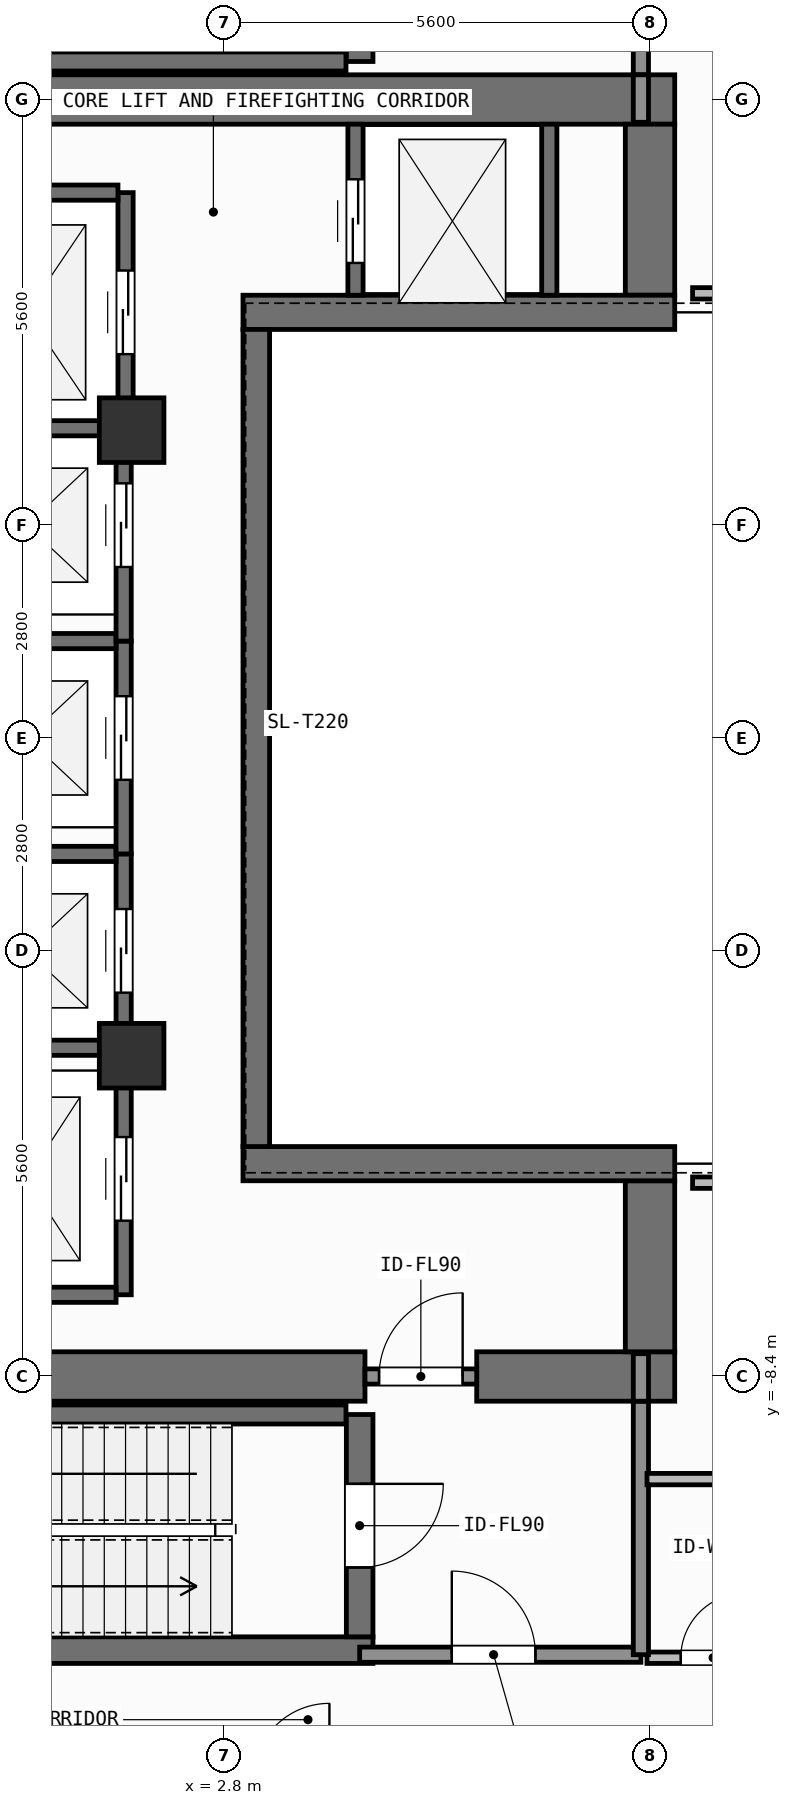
"""IFC4 building model, lengths in metres.
Left out: names, types, materials, properties, quantities, classifications, styles, units other than length and angle.
Written with IfcOpenShell. Run it as: python <this file> out.ifc"""

import sys

from ifc_helpers import new_model, si_unit, direction, frame, frame_2d, origin, origin_2d, place, context, subcontext, project, spatial, rectangle, extrude, element, fill, save


model = new_model("IFC4")
c1 = context("Model", 3, precision=1e-05, world=origin(), true_north=direction((0.0, 1.0)))
c2 = subcontext(c1, "Body", "Model", "MODEL_VIEW")
j1 = project(units=[si_unit("LENGTHUNIT", "METRE"), si_unit("PLANEANGLEUNIT", "RADIAN")], contexts=[c1])
p1 = place(None, origin())
s1 = spatial("IfcSite", under=j1, at=p1, CompositionType="ELEMENT")
p2 = place(p1, origin())
s2 = spatial("IfcBuilding", under=s1, at=p2, CompositionType="ELEMENT")
p3 = place(p2, frame((0.0, 0.0, 266.4)))
s3 = spatial("IfcBuildingStorey", under=s2, at=p3, CompositionType="ELEMENT", Elevation=266.4)
p4 = place(p3, frame((-2.62, -8.4, 0.0), z_axis=(0.0, 0.0, 1.0), x_axis=(1.0, 0.0, 0.0)))
e1 = element("IfcWall", 1, at=p4, inside=s3, PredefinedType="SHEAR", context=c2, shape_type="SweptSolid", body=[
    extrude(rectangle(XDim=7.27, YDim=0.65, at=frame_2d((3.635, 0.0))), origin(), (0.0, 0.0, 1.0), 3.9),
])
p5 = place(p3, frame((6.12, -8.4, 0.0), z_axis=(0.0, 0.0, 1.0), x_axis=(1.0, 0.0, 0.0)))
e2 = element("IfcWall", 2, at=p5, inside=s3, PredefinedType="SHEAR", context=c2, shape_type="SweptSolid", body=[
    extrude(rectangle(XDim=2.605, YDim=0.65, at=frame_2d((1.302, 0.0))), origin(), (0.0, 0.0, 1.0), 3.9),
])
p6 = place(p3, frame((-7.55, 8.4, 0.0), z_axis=(0.0, 0.0, 1.0), x_axis=(1.0, 0.0, 0.0)))
e3 = element("IfcWall", 3, at=p6, inside=s3, PredefinedType="SHEAR", context=c2, shape_type="SweptSolid", body=[
    extrude(rectangle(XDim=16.275, YDim=0.65, at=frame_2d((8.138, 0.0))), origin(), (0.0, 0.0, 1.0), 3.9),
])
for number, where, z_axis, x_axis in (
    (4, (8.4, -8.075, 0.0), (0.0, 0.0, 1.0), (0.0, 1.0, 0.0)),
    (5, (8.4, 5.825, 0.0), (0.0, 0.0, 1.0), (0.0, 1.0, 0.0)),
):
    element("IfcWall", number, at=place(p3, frame(where, z_axis=z_axis, x_axis=x_axis)), inside=s3, PredefinedType="SHEAR", context=c2, shape_type="SweptSolid", body=[
        extrude(rectangle(XDim=2.25, YDim=0.65, at=frame_2d((1.125, 0.0))), origin(), (0.0, 0.0, 1.0), 3.9),
    ])
for number, where, z_axis, x_axis in (
    (6, (3.045, -5.6, 0.0), (0.0, 0.0, 1.0), (1.0, 0.0, 0.0)),
    (7, (3.045, 5.6, 0.0), (0.0, 0.0, 1.0), (1.0, 0.0, 0.0)),
):
    element("IfcWall", number, at=place(p3, frame(where, z_axis=z_axis, x_axis=x_axis)), inside=s3, PredefinedType="SHEAR", context=c2, shape_type="SweptSolid", body=[
        extrude(rectangle(XDim=5.68, YDim=0.45, at=frame_2d((2.84, 0.0))), origin(), (0.0, 0.0, 1.0), 3.9),
    ])
p7 = place(p3, frame((3.22, -5.375, 0.0), z_axis=(0.0, 0.0, 1.0), x_axis=(0.0, 1.0, 0.0)))
e8 = element("IfcWall", 8, at=p7, inside=s3, PredefinedType="SHEAR", context=c2, shape_type="SweptSolid", body=[
    extrude(rectangle(XDim=10.75, YDim=0.35, at=frame_2d((5.375, 0.0))), origin(), (0.0, 0.0, 1.0), 3.9),
])
p8 = place(p3, frame((-2.555, -12.0, 0.0), z_axis=(0.0, 0.0, 1.0), x_axis=(1.0, 0.0, 0.0)))
e9 = element("IfcWall", 9, at=p8, inside=s3, PredefinedType="SHEAR", context=c2, shape_type="SweptSolid", body=[
    extrude(rectangle(XDim=7.31, YDim=0.35, at=frame_2d((3.655, 0.0))), origin(), (0.0, 0.0, 1.0), 3.9),
])
p9 = place(p3, frame((-2.2, -8.9, 0.0), z_axis=(0.0, 0.0, 1.0), x_axis=(1.0, 0.0, 0.0)))
e10 = element("IfcWall", 10, at=p9, inside=s3, PredefinedType="SHEAR", context=c2, shape_type="SweptSolid", body=[
    extrude(rectangle(XDim=6.6, YDim=0.25, at=frame_2d((3.3, 0.0))), origin(), (0.0, 0.0, 1.0), 3.9),
])
p10 = place(p3, frame((4.58, -8.9, 0.0), z_axis=(0.0, 0.0, 1.0), x_axis=(0.0, -1.0, 0.0)))
e11 = element("IfcWall", 11, at=p10, inside=s3, PredefinedType="SHEAR", context=c2, shape_type="SweptSolid", body=[
    extrude(rectangle(XDim=2.925, YDim=0.35, at=frame_2d((1.462, 0.0))), origin(), (0.0, 0.0, 1.0), 3.9),
])
p11 = place(p10, frame((0.913, 0.0, 0.0)))
e12 = element("IfcOpeningElement", 12, at=p11, cuts=e11, PredefinedType="OPENING", context=c2, shape_type="SweptSolid", body=[
    extrude(rectangle(XDim=1.1, YDim=2.15, at=frame_2d((0.55, 1.075))), frame((0.0, 0.185, 0.0), z_axis=(0.0, -1.0, 0.0), x_axis=(1.0, 0.0, 0.0)), (0.0, 0.0, 1.0), 0.37),
])
p12 = place(p3, frame((-2.2, 8.9, 0.0), z_axis=(0.0, 0.0, 1.0), x_axis=(1.0, 0.0, 0.0)))
e13 = element("IfcWall", 13, at=p12, inside=s3, PredefinedType="SHEAR", context=c2, shape_type="SweptSolid", body=[
    extrude(rectangle(XDim=6.6, YDim=0.25, at=frame_2d((3.3, 0.0))), origin(), (0.0, 0.0, 1.0), 3.9),
])
p13 = place(p3, frame((4.58, 11.825, 0.0), z_axis=(0.0, 0.0, 1.0), x_axis=(0.0, -1.0, 0.0)))
e14 = element("IfcWall", 14, at=p13, inside=s3, PredefinedType="SHEAR", context=c2, shape_type="SweptSolid", body=[
    extrude(rectangle(XDim=2.925, YDim=0.35, at=frame_2d((1.462, 0.0))), origin(), (0.0, 0.0, 1.0), 3.9),
])
p14 = place(p13, frame((0.913, 0.0, 0.0)))
e15 = element("IfcOpeningElement", 15, at=p14, cuts=e14, PredefinedType="OPENING", context=c2, shape_type="SweptSolid", body=[
    extrude(rectangle(XDim=1.1, YDim=2.15, at=frame_2d((0.55, 1.075))), frame((0.0, 0.185, 0.0), z_axis=(0.0, -1.0, 0.0), x_axis=(1.0, 0.0, 0.0)), (0.0, 0.0, 1.0), 0.37),
])
for number, where, z_axis, x_axis in (
    (16, (1.58, -4.18, 0.0), (0.0, 0.0, 1.0), (1.0, 0.0, 0.0)),
    (17, (1.58, 4.05, 0.0), (0.0, 0.0, 1.0), (1.0, 0.0, 0.0)),
):
    element("IfcColumn", number, at=place(p3, frame(where, z_axis=z_axis, x_axis=x_axis)), inside=s3, PredefinedType="COLUMN", context=c2, shape_type="SweptSolid", body=[
        extrude(rectangle(XDim=0.85, YDim=0.85, at=origin_2d()), origin(), (0.0, 0.0, 1.0), 3.9),
    ])
p15 = place(p3, frame((1.475, -4.275, 0.0), z_axis=(0.0, 0.0, 1.0), x_axis=(0.0, 1.0, 0.0)))
e18 = element("IfcWall", 18, at=p15, inside=s3, PredefinedType="SHEAR", context=c2, shape_type="SweptSolid", body=[
    extrude(rectangle(XDim=2.75, YDim=0.2, at=frame_2d((1.375, 0.0))), origin(), (0.0, 0.0, 1.0), 3.68),
])
p16 = place(p15, frame((0.925, 0.0, 0.0)))
e19 = element("IfcOpeningElement", 19, at=p16, cuts=e18, PredefinedType="OPENING", context=c2, shape_type="SweptSolid", body=[
    extrude(rectangle(XDim=1.1, YDim=2.2, at=frame_2d((0.55, 1.1))), frame((0.0, 0.11, 0.0), z_axis=(0.0, -1.0, 0.0), x_axis=(1.0, 0.0, 0.0)), (0.0, 0.0, 1.0), 0.22),
])
for number, where, z_axis, x_axis in (
    (20, (-0.975, -4.075, 0.0), (0.0, 0.0, 1.0), (1.0, 0.0, 0.0)),
    (21, (-0.975, -1.525, 0.0), (0.0, 0.0, 1.0), (1.0, 0.0, 0.0)),
):
    element("IfcWall", number, at=place(p3, frame(where, z_axis=z_axis, x_axis=x_axis)), inside=s3, PredefinedType="SHEAR", context=c2, shape_type="SweptSolid", body=[
        extrude(rectangle(XDim=2.35, YDim=0.2, at=frame_2d((1.175, 0.0))), origin(), (0.0, 0.0, 1.0), 3.68),
    ])
p17 = place(p3, frame((1.475, -1.525, 0.0), z_axis=(0.0, 0.0, 1.0), x_axis=(0.0, 1.0, 0.0)))
e22 = element("IfcWall", 22, at=p17, inside=s3, PredefinedType="SHEAR", context=c2, shape_type="SweptSolid", body=[
    extrude(rectangle(XDim=2.8, YDim=0.2, at=frame_2d((1.4, 0.0))), origin(), (0.0, 0.0, 1.0), 3.68),
])
p18 = place(p17, frame((0.975, 0.0, 0.0)))
e23 = element("IfcOpeningElement", 23, at=p18, cuts=e22, PredefinedType="OPENING", context=c2, shape_type="SweptSolid", body=[
    extrude(rectangle(XDim=1.1, YDim=2.2, at=frame_2d((0.55, 1.1))), frame((0.0, 0.11, 0.0), z_axis=(0.0, -1.0, 0.0), x_axis=(1.0, 0.0, 0.0)), (0.0, 0.0, 1.0), 0.22),
])
p19 = place(p3, frame((-0.975, 1.275, 0.0), z_axis=(0.0, 0.0, 1.0), x_axis=(1.0, 0.0, 0.0)))
e24 = element("IfcWall", 24, at=p19, inside=s3, PredefinedType="SHEAR", context=c2, shape_type="SweptSolid", body=[
    extrude(rectangle(XDim=2.35, YDim=0.2, at=frame_2d((1.175, 0.0))), origin(), (0.0, 0.0, 1.0), 3.68),
])
p20 = place(p3, frame((1.475, 1.275, 0.0), z_axis=(0.0, 0.0, 1.0), x_axis=(0.0, 1.0, 0.0)))
e25 = element("IfcWall", 25, at=p20, inside=s3, PredefinedType="SHEAR", context=c2, shape_type="SweptSolid", body=[
    extrude(rectangle(XDim=2.8, YDim=0.2, at=frame_2d((1.4, 0.0))), origin(), (0.0, 0.0, 1.0), 3.68),
])
p21 = place(p20, frame((0.975, 0.0, 0.0)))
e26 = element("IfcOpeningElement", 26, at=p21, cuts=e25, PredefinedType="OPENING", context=c2, shape_type="SweptSolid", body=[
    extrude(rectangle(XDim=1.1, YDim=2.2, at=frame_2d((0.55, 1.1))), frame((0.0, 0.11, 0.0), z_axis=(0.0, -1.0, 0.0), x_axis=(1.0, 0.0, 0.0)), (0.0, 0.0, 1.0), 0.22),
])
p22 = place(p3, frame((-0.975, 4.075, 0.0), z_axis=(0.0, 0.0, 1.0), x_axis=(1.0, 0.0, 0.0)))
e27 = element("IfcWall", 27, at=p22, inside=s3, PredefinedType="SHEAR", context=c2, shape_type="SweptSolid", body=[
    extrude(rectangle(XDim=2.35, YDim=0.2, at=frame_2d((1.175, 0.0))), origin(), (0.0, 0.0, 1.0), 3.68),
])
p23 = place(p3, frame((1.5, 4.025, 0.0), z_axis=(0.0, 0.0, 1.0), x_axis=(0.0, 1.0, 0.0)))
e28 = element("IfcWall", 28, at=p23, inside=s3, PredefinedType="SHEAR", context=c2, shape_type="SweptSolid", body=[
    extrude(rectangle(XDim=3.15, YDim=0.2, at=frame_2d((1.575, 0.0))), origin(), (0.0, 0.0, 1.0), 3.68),
])
p24 = place(p23, frame((1.025, 0.0, 0.0)))
e29 = element("IfcOpeningElement", 29, at=p24, cuts=e28, PredefinedType="OPENING", context=c2, shape_type="SweptSolid", body=[
    extrude(rectangle(XDim=1.1, YDim=2.2, at=frame_2d((0.55, 1.1))), frame((0.0, 0.11, 0.0), z_axis=(0.0, -1.0, 0.0), x_axis=(1.0, 0.0, 0.0)), (0.0, 0.0, 1.0), 0.22),
])
p25 = place(p3, frame((-1.0, 7.175, 0.0), z_axis=(0.0, 0.0, 1.0), x_axis=(1.0, 0.0, 0.0)))
e30 = element("IfcWall", 30, at=p25, inside=s3, PredefinedType="SHEAR", context=c2, shape_type="SweptSolid", body=[
    extrude(rectangle(XDim=2.4, YDim=0.2, at=frame_2d((1.2, 0.0))), origin(), (0.0, 0.0, 1.0), 3.68),
])
p26 = place(p3, frame((1.475, -7.325, 0.0), z_axis=(0.0, 0.0, 1.0), x_axis=(0.0, 1.0, 0.0)))
e31 = element("IfcWall", 31, at=p26, inside=s3, PredefinedType="SHEAR", context=c2, shape_type="SweptSolid", body=[
    extrude(rectangle(XDim=3.05, YDim=0.2, at=frame_2d((1.525, 0.0))), origin(), (0.0, 0.0, 1.0), 3.68),
])
p27 = place(p26, frame((0.975, 0.0, 0.0)))
e32 = element("IfcOpeningElement", 32, at=p27, cuts=e31, PredefinedType="OPENING", context=c2, shape_type="SweptSolid", body=[
    extrude(rectangle(XDim=1.1, YDim=2.2, at=frame_2d((0.55, 1.1))), frame((0.0, 0.11, 0.0), z_axis=(0.0, -1.0, 0.0), x_axis=(1.0, 0.0, 0.0)), (0.0, 0.0, 1.0), 0.22),
])
p28 = place(p3, frame((-0.975, -7.325, 0.0), z_axis=(0.0, 0.0, 1.0), x_axis=(1.0, 0.0, 0.0)))
e33 = element("IfcWall", 33, at=p28, inside=s3, PredefinedType="SHEAR", context=c2, shape_type="SweptSolid", body=[
    extrude(rectangle(XDim=2.35, YDim=0.2, at=frame_2d((1.175, 0.0))), origin(), (0.0, 0.0, 1.0), 3.68),
])
p29 = place(p3, frame((4.525, 5.825, 0.0), z_axis=(0.0, 0.0, 1.0), x_axis=(0.0, 1.0, 0.0)))
e34 = element("IfcWall", 34, at=p29, inside=s3, PredefinedType="SHEAR", context=c2, shape_type="SweptSolid", body=[
    extrude(rectangle(XDim=2.25, YDim=0.2, at=frame_2d((1.125, 0.0))), origin(), (0.0, 0.0, 1.0), 3.68),
])
p30 = place(p29, frame((0.425, 0.0, 0.0)))
e35 = element("IfcOpeningElement", 35, at=p30, cuts=e34, PredefinedType="OPENING", context=c2, shape_type="SweptSolid", body=[
    extrude(rectangle(XDim=1.1, YDim=2.2, at=frame_2d((0.55, 1.1))), frame((0.0, 0.11, 0.0), z_axis=(0.0, -1.0, 0.0), x_axis=(1.0, 0.0, 0.0)), (0.0, 0.0, 1.0), 0.22),
])
p31 = place(p3, frame((7.075, 5.825, 0.0), z_axis=(0.0, 0.0, 1.0), x_axis=(0.0, 1.0, 0.0)))
e36 = element("IfcWall", 36, at=p31, inside=s3, PredefinedType="SHEAR", context=c2, shape_type="SweptSolid", body=[
    extrude(rectangle(XDim=2.25, YDim=0.2, at=frame_2d((1.125, 0.0))), origin(), (0.0, 0.0, 1.0), 3.68),
])
p32 = place(p3, frame((4.58, -12.06, 0.0), z_axis=(0.0, 0.0, 1.0), x_axis=(1.0, 0.0, 0.0)))
e37 = element("IfcWall", 37, at=p32, inside=s3, PredefinedType="SOLIDWALL", context=c2, shape_type="SweptSolid", body=[
    extrude(rectangle(XDim=3.7, YDim=0.2, at=frame_2d((1.85, 0.0))), origin(), (0.0, 0.0, 1.0), 3.68),
])
p33 = place(p32, frame((1.212, 0.0, 0.0)))
e38 = element("IfcOpeningElement", 38, at=p33, cuts=e37, PredefinedType="OPENING", context=c2, shape_type="SweptSolid", body=[
    extrude(rectangle(XDim=1.1, YDim=2.15, at=frame_2d((0.55, 1.075))), frame((0.0, 0.11, 0.0), z_axis=(0.0, -1.0, 0.0), x_axis=(1.0, 0.0, 0.0)), (0.0, 0.0, 1.0), 0.22),
])
p34 = place(p3, frame((4.65, -8.4, 0.0), z_axis=(0.0, 0.0, 1.0), x_axis=(1.0, 0.0, 0.0)))
e39 = element("IfcWall", 39, at=p34, inside=s3, PredefinedType="SOLIDWALL", context=c2, shape_type="SweptSolid", body=[
    extrude(rectangle(XDim=1.47, YDim=0.2, at=frame_2d((0.735, 0.0))), origin(), (0.0, 0.0, 1.0), 2.92),
])
p35 = place(p34, frame((0.185, 0.0, 0.0)))
e40 = element("IfcOpeningElement", 40, at=p35, cuts=e39, PredefinedType="OPENING", context=c2, shape_type="SweptSolid", body=[
    extrude(rectangle(XDim=1.1, YDim=2.15, at=frame_2d((0.55, 1.075))), frame((0.0, 0.11, 0.0), z_axis=(0.0, -1.0, 0.0), x_axis=(1.0, 0.0, 0.0)), (0.0, 0.0, 1.0), 0.22),
])
p36 = place(p3, frame((8.36, -12.1, 0.0), z_axis=(0.0, 0.0, 1.0), x_axis=(1.0, 0.0, 0.0)))
e41 = element("IfcWall", 41, at=p36, inside=s3, PredefinedType="PARTITIONING", context=c2, shape_type="SweptSolid", body=[
    extrude(rectangle(XDim=1.74, YDim=0.15, at=frame_2d((0.87, 0.0))), origin(), (0.0, 0.0, 1.0), 3.68),
])
p37 = place(p36, frame((0.445, 0.0, 0.0)))
e42 = element("IfcOpeningElement", 42, at=p37, cuts=e41, PredefinedType="OPENING", context=c2, shape_type="SweptSolid", body=[
    extrude(rectangle(XDim=0.85, YDim=2.1, at=frame_2d((0.425, 1.05))), frame((0.0, 0.085, 0.0), z_axis=(0.0, -1.0, 0.0), x_axis=(1.0, 0.0, 0.0)), (0.0, 0.0, 1.0), 0.17),
])
for number, where, z_axis, x_axis in (
    (43, (8.28, -12.06, 0.0), (0.0, 0.0, 1.0), (0.0, 1.0, 0.0)),
    (44, (8.28, 8.725, 0.0), (0.0, 0.0, 1.0), (0.0, 1.0, 0.0)),
):
    element("IfcWall", number, at=place(p3, frame(where, z_axis=z_axis, x_axis=x_axis)), inside=s3, PredefinedType="SOLIDWALL", context=c2, shape_type="SweptSolid", body=[
        extrude(rectangle(XDim=3.335, YDim=0.2, at=frame_2d((1.667, 0.0))), origin(), (0.0, 0.0, 1.0), 3.68),
    ])
p38 = place(p3, frame((8.28, -8.725, 0.0), z_axis=(0.0, 0.0, 1.0), x_axis=(0.0, 1.0, 0.0)))
e45 = element("IfcWall", 45, at=p38, inside=s3, PredefinedType="SOLIDWALL", context=c2, shape_type="SweptSolid", body=[
    extrude(rectangle(XDim=0.625, YDim=0.2, at=frame_2d((0.312, 0.0))), origin(), (0.0, 0.0, 1.0), 3.68),
])
p39 = place(p3, frame((8.36, -9.75, 0.0), z_axis=(0.0, 0.0, 1.0), x_axis=(1.0, 0.0, 0.0)))
e46 = element("IfcWall", 46, at=p39, inside=s3, PredefinedType="PARTITIONING", context=c2, shape_type="SweptSolid", body=[
    extrude(rectangle(XDim=1.74, YDim=0.15, at=frame_2d((0.87, 0.0))), origin(), (0.0, 0.0, 1.0), 3.68),
])
p40 = place(p3, frame((8.96, -5.85, 0.0), z_axis=(0.0, 0.0, 1.0), x_axis=(1.0, 0.0, 0.0)))
e47 = element("IfcWall", 47, at=p40, inside=s3, PredefinedType="PARTITIONING", context=c2, shape_type="SweptSolid", body=[
    extrude(rectangle(XDim=6.62, YDim=0.15, at=frame_2d((3.31, 0.0))), origin(), (0.0, 0.0, 1.0), 3.68),
])
p41 = place(p3, frame((8.28, 8.1, 0.0), z_axis=(0.0, 0.0, 1.0), x_axis=(0.0, 1.0, 0.0)))
e48 = element("IfcWall", 48, at=p41, inside=s3, PredefinedType="SOLIDWALL", context=c2, shape_type="SweptSolid", body=[
    extrude(rectangle(XDim=0.625, YDim=0.2, at=frame_2d((0.312, 0.0))), origin(), (0.0, 0.0, 1.0), 3.68),
])
p42 = place(p3, frame((8.96, 5.85, 0.0), z_axis=(0.0, 0.0, 1.0), x_axis=(1.0, 0.0, 0.0)))
e49 = element("IfcWall", 49, at=p42, inside=s3, PredefinedType="PARTITIONING", context=c2, shape_type="SweptSolid", body=[
    extrude(rectangle(XDim=6.62, YDim=0.15, at=frame_2d((3.31, 0.0))), origin(), (0.0, 0.0, 1.0), 3.68),
])
p43 = place(p16, origin())
e50 = element("IfcDoor", 50, at=p43, inside=s3, OperationType="SLIDING_TO_LEFT", PredefinedType="DOOR", context=c2, shape_type="SweptSolid", body=[
    extrude(rectangle(XDim=1.1, YDim=2.2, at=frame_2d((0.55, 1.1))), frame((0.0, 0.025, 0.0), z_axis=(0.0, -1.0, 0.0), x_axis=(1.0, 0.0, 0.0)), (0.0, 0.0, 1.0), 0.05),
])
fill(e19, e50)
p44 = place(p18, origin())
e51 = element("IfcDoor", 51, at=p44, inside=s3, OperationType="SLIDING_TO_LEFT", PredefinedType="DOOR", context=c2, shape_type="SweptSolid", body=[
    extrude(rectangle(XDim=1.1, YDim=2.2, at=frame_2d((0.55, 1.1))), frame((0.0, 0.025, 0.0), z_axis=(0.0, -1.0, 0.0), x_axis=(1.0, 0.0, 0.0)), (0.0, 0.0, 1.0), 0.05),
])
fill(e23, e51)
p45 = place(p21, origin())
e52 = element("IfcDoor", 52, at=p45, inside=s3, OperationType="SLIDING_TO_LEFT", PredefinedType="DOOR", context=c2, shape_type="SweptSolid", body=[
    extrude(rectangle(XDim=1.1, YDim=2.2, at=frame_2d((0.55, 1.1))), frame((0.0, 0.025, 0.0), z_axis=(0.0, -1.0, 0.0), x_axis=(1.0, 0.0, 0.0)), (0.0, 0.0, 1.0), 0.05),
])
fill(e26, e52)
p46 = place(p24, origin())
e53 = element("IfcDoor", 53, at=p46, inside=s3, OperationType="SLIDING_TO_LEFT", PredefinedType="DOOR", context=c2, shape_type="SweptSolid", body=[
    extrude(rectangle(XDim=1.1, YDim=2.2, at=frame_2d((0.55, 1.1))), frame((0.0, 0.025, 0.0), z_axis=(0.0, -1.0, 0.0), x_axis=(1.0, 0.0, 0.0)), (0.0, 0.0, 1.0), 0.05),
])
fill(e29, e53)
p47 = place(p27, origin())
e54 = element("IfcDoor", 54, at=p47, inside=s3, OperationType="SLIDING_TO_LEFT", PredefinedType="DOOR", context=c2, shape_type="SweptSolid", body=[
    extrude(rectangle(XDim=1.1, YDim=2.2, at=frame_2d((0.55, 1.1))), frame((0.0, 0.025, 0.0), z_axis=(0.0, -1.0, 0.0), x_axis=(1.0, 0.0, 0.0)), (0.0, 0.0, 1.0), 0.05),
])
fill(e32, e54)
p48 = place(p30, origin())
e55 = element("IfcDoor", 55, at=p48, inside=s3, OperationType="SLIDING_TO_LEFT", PredefinedType="DOOR", context=c2, shape_type="SweptSolid", body=[
    extrude(rectangle(XDim=1.1, YDim=2.2, at=frame_2d((0.55, 1.1))), frame((0.0, 0.025, 0.0), z_axis=(0.0, -1.0, 0.0), x_axis=(1.0, 0.0, 0.0)), (0.0, 0.0, 1.0), 0.05),
])
fill(e35, e55)
p49 = place(p11, origin())
e56 = element("IfcDoor", 56, at=p49, inside=s3, OperationType="SINGLE_SWING_LEFT", PredefinedType="DOOR", context=c2, shape_type="SweptSolid", body=[
    extrude(rectangle(XDim=1.1, YDim=2.15, at=frame_2d((0.55, 1.075))), frame((0.0, 0.025, 0.0), z_axis=(0.0, -1.0, 0.0), x_axis=(1.0, 0.0, 0.0)), (0.0, 0.0, 1.0), 0.05),
])
fill(e12, e56)
p50 = place(p33, origin())
e57 = element("IfcDoor", 57, at=p50, inside=s3, OperationType="SINGLE_SWING_LEFT", PredefinedType="DOOR", context=c2, shape_type="SweptSolid", body=[
    extrude(rectangle(XDim=1.1, YDim=2.15, at=frame_2d((0.55, 1.075))), frame((0.0, 0.025, 0.0), z_axis=(0.0, -1.0, 0.0), x_axis=(1.0, 0.0, 0.0)), (0.0, 0.0, 1.0), 0.05),
])
fill(e38, e57)
p51 = place(p35, origin())
e58 = element("IfcDoor", 58, at=p51, inside=s3, OperationType="SINGLE_SWING_RIGHT", PredefinedType="DOOR", context=c2, shape_type="SweptSolid", body=[
    extrude(rectangle(XDim=1.1, YDim=2.15, at=frame_2d((0.55, 1.075))), frame((0.0, 0.025, 0.0), z_axis=(0.0, -1.0, 0.0), x_axis=(1.0, 0.0, 0.0)), (0.0, 0.0, 1.0), 0.05),
])
fill(e40, e58)
p52 = place(p37, origin())
e59 = element("IfcDoor", 59, at=p52, inside=s3, OperationType="SINGLE_SWING_RIGHT", PredefinedType="DOOR", context=c2, shape_type="SweptSolid", body=[
    extrude(rectangle(XDim=0.85, YDim=2.1, at=frame_2d((0.425, 1.05))), frame((0.0, 0.025, 0.0), z_axis=(0.0, -1.0, 0.0), x_axis=(1.0, 0.0, 0.0)), (0.0, 0.0, 1.0), 0.05),
])
fill(e42, e59)
save(model, sys.argv[1])
